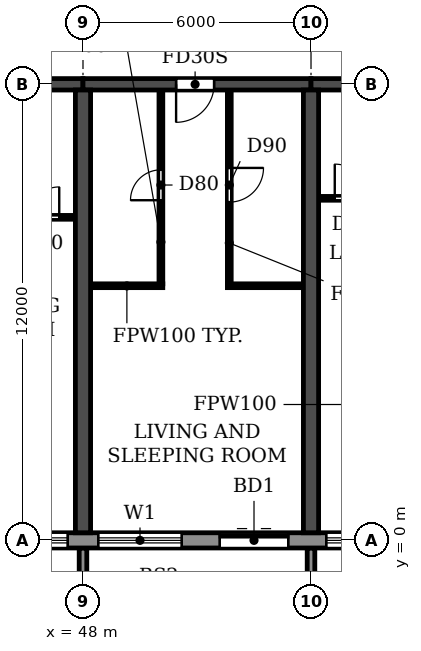
"""IFC4 building model, lengths in metres.
Left out: names, types, materials, properties, quantities, classifications, styles, units other than length and angle.
Written with IfcOpenShell. Run it as: python <this file> out.ifc"""

import sys

from ifc_helpers import new_model, si_unit, direction, frame, frame_2d, origin, place, context, subcontext, project, spatial, polyline, rectangle, outline, extrude, source, transform, mapped, element, fill, save


model = new_model("IFC4")
c1 = context("Model", 3, precision=1e-05, world=origin(), true_north=direction((0.0, 1.0)))
c2 = subcontext(c1, "Body", "Model", "MODEL_VIEW")
j1 = project(units=[si_unit("LENGTHUNIT", "METRE"), si_unit("PLANEANGLEUNIT", "RADIAN")], contexts=[c1])
p1 = place(None, origin())
s1 = spatial("IfcSite", under=j1, at=p1, CompositionType="ELEMENT")
p2 = place(p1, origin())
s2 = spatial("IfcBuilding", under=s1, at=p2, CompositionType="ELEMENT")
p3 = place(p2, frame((0.0, 0.0, 56.4)))
s3 = spatial("IfcBuildingStorey", under=s2, at=p3, CompositionType="ELEMENT", Elevation=56.4)
for number, where, z_axis, x_axis in (
    (1, (48.0, 0.2, 0.0), (0.0, 0.0, 1.0), (0.0, 1.0, 0.0)),
    (2, (54.0, 0.2, 0.0), (0.0, 0.0, 1.0), (0.0, 1.0, 0.0)),
):
    element("IfcWall", number, at=place(p3, frame(where, z_axis=z_axis, x_axis=x_axis)), inside=s3, PredefinedType="SHEAR", context=c2, shape_type="SweptSolid", body=[
        extrude(rectangle(XDim=11.65, YDim=0.4, at=frame_2d((5.825, 0.0))), origin(), (0.0, 0.0, 1.0), 3.05),
    ])
p4 = place(p3, frame((42.0, 12.0, 0.0), z_axis=(0.0, 0.0, 1.0), x_axis=(1.0, 0.0, 0.0)))
e3 = element("IfcWall", 3, at=p4, inside=s3, PredefinedType="SHEAR", context=c2, shape_type="SweptSolid", body=[
    extrude(rectangle(XDim=6.0, YDim=0.3, at=frame_2d((3.0, 0.0))), origin(), (0.0, 0.0, 1.0), 2.45),
])
p5 = place(p4, frame((2.55, 0.0, 0.0)))
e4 = element("IfcOpeningElement", 4, at=p5, cuts=e3, PredefinedType="OPENING", context=c2, shape_type="SweptSolid", body=[
    extrude(rectangle(XDim=1.0, YDim=2.1, at=frame_2d((0.5, 1.05))), frame((0.0, 0.16, 0.0), z_axis=(0.0, -1.0, 0.0), x_axis=(1.0, 0.0, 0.0)), (0.0, 0.0, 1.0), 0.32),
])
p6 = place(p3, frame((48.0, 12.0, 0.0), z_axis=(0.0, 0.0, 1.0), x_axis=(1.0, 0.0, 0.0)))
e5 = element("IfcWall", 5, at=p6, inside=s3, PredefinedType="SHEAR", context=c2, shape_type="SweptSolid", body=[
    extrude(rectangle(XDim=6.0, YDim=0.3, at=frame_2d((3.0, 0.0))), origin(), (0.0, 0.0, 1.0), 2.45),
])
p7 = place(p6, frame((2.45, 0.0, 0.0)))
e6 = element("IfcOpeningElement", 6, at=p7, cuts=e5, PredefinedType="OPENING", context=c2, shape_type="SweptSolid", body=[
    extrude(rectangle(XDim=1.0, YDim=2.1, at=frame_2d((0.5, 1.05))), frame((0.0, 0.16, 0.0), z_axis=(0.0, -1.0, 0.0), x_axis=(1.0, 0.0, 0.0)), (0.0, 0.0, 1.0), 0.32),
])
p8 = place(p3, frame((54.0, 12.0, 0.0), z_axis=(0.0, 0.0, 1.0), x_axis=(1.0, 0.0, 0.0)))
e7 = element("IfcWall", 7, at=p8, inside=s3, PredefinedType="SHEAR", context=c2, shape_type="SweptSolid", body=[
    extrude(rectangle(XDim=6.0, YDim=0.3, at=frame_2d((3.0, 0.0))), origin(), (0.0, 0.0, 1.0), 2.45),
])
p9 = place(p8, frame((2.55, 0.0, 0.0)))
e8 = element("IfcOpeningElement", 8, at=p9, cuts=e7, PredefinedType="OPENING", context=c2, shape_type="SweptSolid", body=[
    extrude(rectangle(XDim=1.0, YDim=2.1, at=frame_2d((0.5, 1.05))), frame((0.0, 0.16, 0.0), z_axis=(0.0, -1.0, 0.0), x_axis=(1.0, 0.0, 0.0)), (0.0, 0.0, 1.0), 0.32),
])
p10 = place(p3, frame((10.683, 0.0, 0.0), z_axis=(0.0, 0.0, 1.0), x_axis=(1.0, 0.0, 0.0)))
e9 = element("IfcWall", 9, at=p10, inside=s3, PredefinedType="STANDARD", context=c2, shape_type="SweptSolid", body=[
    extrude(rectangle(XDim=80.634, YDim=0.4, at=frame_2d((40.317, 0.0))), origin(), (0.0, 0.0, 1.0), 3.05),
])
p11 = place(p10, frame((1.717, 0.0, 0.9)))
e10 = element("IfcOpeningElement", 10, at=p11, cuts=e9, PredefinedType="OPENING", context=c2, shape_type="SweptSolid", body=[
    extrude(rectangle(XDim=2.2, YDim=1.5, at=frame_2d((1.1, 0.75))), frame((0.0, 0.21, 0.0), z_axis=(0.0, -1.0, 0.0), x_axis=(1.0, 0.0, 0.0)), (0.0, 0.0, 1.0), 0.42),
])
p12 = place(p10, frame((4.917, 0.0, 0.0)))
e11 = element("IfcOpeningElement", 11, at=p12, cuts=e9, PredefinedType="OPENING", context=c2, shape_type="SweptSolid", body=[
    extrude(rectangle(XDim=1.8, YDim=2.4, at=frame_2d((0.9, 1.2))), frame((0.0, 0.21, 0.0), z_axis=(0.0, -1.0, 0.0), x_axis=(1.0, 0.0, 0.0)), (0.0, 0.0, 1.0), 0.42),
])
p13 = place(p10, frame((7.717, 0.0, 0.9)))
e12 = element("IfcOpeningElement", 12, at=p13, cuts=e9, PredefinedType="OPENING", context=c2, shape_type="SweptSolid", body=[
    extrude(rectangle(XDim=2.2, YDim=1.5, at=frame_2d((1.1, 0.75))), frame((0.0, 0.21, 0.0), z_axis=(0.0, -1.0, 0.0), x_axis=(1.0, 0.0, 0.0)), (0.0, 0.0, 1.0), 0.42),
])
p14 = place(p10, frame((10.717, 0.0, 0.9)))
e13 = element("IfcOpeningElement", 13, at=p14, cuts=e9, PredefinedType="OPENING", context=c2, shape_type="SweptSolid", body=[
    extrude(rectangle(XDim=2.2, YDim=1.5, at=frame_2d((1.1, 0.75))), frame((0.0, 0.21, 0.0), z_axis=(0.0, -1.0, 0.0), x_axis=(1.0, 0.0, 0.0)), (0.0, 0.0, 1.0), 0.42),
])
p15 = place(p10, frame((13.717, 0.0, 0.9)))
e14 = element("IfcOpeningElement", 14, at=p15, cuts=e9, PredefinedType="OPENING", context=c2, shape_type="SweptSolid", body=[
    extrude(rectangle(XDim=2.2, YDim=1.5, at=frame_2d((1.1, 0.75))), frame((0.0, 0.21, 0.0), z_axis=(0.0, -1.0, 0.0), x_axis=(1.0, 0.0, 0.0)), (0.0, 0.0, 1.0), 0.42),
])
p16 = place(p10, frame((16.917, 0.0, 0.0)))
e15 = element("IfcOpeningElement", 15, at=p16, cuts=e9, PredefinedType="OPENING", context=c2, shape_type="SweptSolid", body=[
    extrude(rectangle(XDim=1.8, YDim=2.4, at=frame_2d((0.9, 1.2))), frame((0.0, 0.21, 0.0), z_axis=(0.0, -1.0, 0.0), x_axis=(1.0, 0.0, 0.0)), (0.0, 0.0, 1.0), 0.42),
])
p17 = place(p10, frame((19.717, 0.0, 0.9)))
e16 = element("IfcOpeningElement", 16, at=p17, cuts=e9, PredefinedType="OPENING", context=c2, shape_type="SweptSolid", body=[
    extrude(rectangle(XDim=2.2, YDim=1.5, at=frame_2d((1.1, 0.75))), frame((0.0, 0.21, 0.0), z_axis=(0.0, -1.0, 0.0), x_axis=(1.0, 0.0, 0.0)), (0.0, 0.0, 1.0), 0.42),
])
p18 = place(p10, frame((22.717, 0.0, 0.9)))
e17 = element("IfcOpeningElement", 17, at=p18, cuts=e9, PredefinedType="OPENING", context=c2, shape_type="SweptSolid", body=[
    extrude(rectangle(XDim=2.2, YDim=1.5, at=frame_2d((1.1, 0.75))), frame((0.0, 0.21, 0.0), z_axis=(0.0, -1.0, 0.0), x_axis=(1.0, 0.0, 0.0)), (0.0, 0.0, 1.0), 0.42),
])
p19 = place(p10, frame((25.917, 0.0, 0.0)))
e18 = element("IfcOpeningElement", 18, at=p19, cuts=e9, PredefinedType="OPENING", context=c2, shape_type="SweptSolid", body=[
    extrude(rectangle(XDim=1.8, YDim=2.4, at=frame_2d((0.9, 1.2))), frame((0.0, 0.21, 0.0), z_axis=(0.0, -1.0, 0.0), x_axis=(1.0, 0.0, 0.0)), (0.0, 0.0, 1.0), 0.42),
])
p20 = place(p10, frame((28.717, 0.0, 0.9)))
e19 = element("IfcOpeningElement", 19, at=p20, cuts=e9, PredefinedType="OPENING", context=c2, shape_type="SweptSolid", body=[
    extrude(rectangle(XDim=2.2, YDim=1.5, at=frame_2d((1.1, 0.75))), frame((0.0, 0.21, 0.0), z_axis=(0.0, -1.0, 0.0), x_axis=(1.0, 0.0, 0.0)), (0.0, 0.0, 1.0), 0.42),
])
p21 = place(p10, frame((31.717, 0.0, 0.9)))
e20 = element("IfcOpeningElement", 20, at=p21, cuts=e9, PredefinedType="OPENING", context=c2, shape_type="SweptSolid", body=[
    extrude(rectangle(XDim=2.2, YDim=1.5, at=frame_2d((1.1, 0.75))), frame((0.0, 0.21, 0.0), z_axis=(0.0, -1.0, 0.0), x_axis=(1.0, 0.0, 0.0)), (0.0, 0.0, 1.0), 0.42),
])
p22 = place(p10, frame((34.717, 0.0, 0.9)))
e21 = element("IfcOpeningElement", 21, at=p22, cuts=e9, PredefinedType="OPENING", context=c2, shape_type="SweptSolid", body=[
    extrude(rectangle(XDim=2.2, YDim=1.5, at=frame_2d((1.1, 0.75))), frame((0.0, 0.21, 0.0), z_axis=(0.0, -1.0, 0.0), x_axis=(1.0, 0.0, 0.0)), (0.0, 0.0, 1.0), 0.42),
])
p23 = place(p10, frame((37.717, 0.0, 0.9)))
e22 = element("IfcOpeningElement", 22, at=p23, cuts=e9, PredefinedType="OPENING", context=c2, shape_type="SweptSolid", body=[
    extrude(rectangle(XDim=2.2, YDim=1.5, at=frame_2d((1.1, 0.75))), frame((0.0, 0.21, 0.0), z_axis=(0.0, -1.0, 0.0), x_axis=(1.0, 0.0, 0.0)), (0.0, 0.0, 1.0), 0.42),
])
p24 = place(p10, frame((40.917, 0.0, 0.0)))
e23 = element("IfcOpeningElement", 23, at=p24, cuts=e9, PredefinedType="OPENING", context=c2, shape_type="SweptSolid", body=[
    extrude(rectangle(XDim=1.8, YDim=2.4, at=frame_2d((0.9, 1.2))), frame((0.0, 0.21, 0.0), z_axis=(0.0, -1.0, 0.0), x_axis=(1.0, 0.0, 0.0)), (0.0, 0.0, 1.0), 0.42),
])
p25 = place(p10, frame((43.717, 0.0, 0.9)))
e24 = element("IfcOpeningElement", 24, at=p25, cuts=e9, PredefinedType="OPENING", context=c2, shape_type="SweptSolid", body=[
    extrude(rectangle(XDim=2.2, YDim=1.5, at=frame_2d((1.1, 0.75))), frame((0.0, 0.21, 0.0), z_axis=(0.0, -1.0, 0.0), x_axis=(1.0, 0.0, 0.0)), (0.0, 0.0, 1.0), 0.42),
])
p26 = place(p10, frame((46.717, 0.0, 0.9)))
e25 = element("IfcOpeningElement", 25, at=p26, cuts=e9, PredefinedType="OPENING", context=c2, shape_type="SweptSolid", body=[
    extrude(rectangle(XDim=2.2, YDim=1.5, at=frame_2d((1.1, 0.75))), frame((0.0, 0.21, 0.0), z_axis=(0.0, -1.0, 0.0), x_axis=(1.0, 0.0, 0.0)), (0.0, 0.0, 1.0), 0.42),
])
p27 = place(p10, frame((49.717, 0.0, 0.9)))
e26 = element("IfcOpeningElement", 26, at=p27, cuts=e9, PredefinedType="OPENING", context=c2, shape_type="SweptSolid", body=[
    extrude(rectangle(XDim=2.2, YDim=1.5, at=frame_2d((1.1, 0.75))), frame((0.0, 0.21, 0.0), z_axis=(0.0, -1.0, 0.0), x_axis=(1.0, 0.0, 0.0)), (0.0, 0.0, 1.0), 0.42),
])
p28 = place(p10, frame((52.717, 0.0, 0.9)))
e27 = element("IfcOpeningElement", 27, at=p28, cuts=e9, PredefinedType="OPENING", context=c2, shape_type="SweptSolid", body=[
    extrude(rectangle(XDim=2.2, YDim=1.5, at=frame_2d((1.1, 0.75))), frame((0.0, 0.21, 0.0), z_axis=(0.0, -1.0, 0.0), x_axis=(1.0, 0.0, 0.0)), (0.0, 0.0, 1.0), 0.42),
])
p29 = place(p10, frame((55.717, 0.0, 0.9)))
e28 = element("IfcOpeningElement", 28, at=p29, cuts=e9, PredefinedType="OPENING", context=c2, shape_type="SweptSolid", body=[
    extrude(rectangle(XDim=2.2, YDim=1.5, at=frame_2d((1.1, 0.75))), frame((0.0, 0.21, 0.0), z_axis=(0.0, -1.0, 0.0), x_axis=(1.0, 0.0, 0.0)), (0.0, 0.0, 1.0), 0.42),
])
p30 = place(p10, frame((58.717, 0.0, 0.9)))
e29 = element("IfcOpeningElement", 29, at=p30, cuts=e9, PredefinedType="OPENING", context=c2, shape_type="SweptSolid", body=[
    extrude(rectangle(XDim=2.2, YDim=1.5, at=frame_2d((1.1, 0.75))), frame((0.0, 0.21, 0.0), z_axis=(0.0, -1.0, 0.0), x_axis=(1.0, 0.0, 0.0)), (0.0, 0.0, 1.0), 0.42),
])
p31 = place(p10, frame((61.717, 0.0, 0.9)))
e30 = element("IfcOpeningElement", 30, at=p31, cuts=e9, PredefinedType="OPENING", context=c2, shape_type="SweptSolid", body=[
    extrude(rectangle(XDim=2.2, YDim=1.5, at=frame_2d((1.1, 0.75))), frame((0.0, 0.21, 0.0), z_axis=(0.0, -1.0, 0.0), x_axis=(1.0, 0.0, 0.0)), (0.0, 0.0, 1.0), 0.42),
])
p32 = place(p10, frame((64.917, 0.0, 0.0)))
e31 = element("IfcOpeningElement", 31, at=p32, cuts=e9, PredefinedType="OPENING", context=c2, shape_type="SweptSolid", body=[
    extrude(rectangle(XDim=1.8, YDim=2.4, at=frame_2d((0.9, 1.2))), frame((0.0, 0.21, 0.0), z_axis=(0.0, -1.0, 0.0), x_axis=(1.0, 0.0, 0.0)), (0.0, 0.0, 1.0), 0.42),
])
p33 = place(p10, frame((67.717, 0.0, 0.9)))
e32 = element("IfcOpeningElement", 32, at=p33, cuts=e9, PredefinedType="OPENING", context=c2, shape_type="SweptSolid", body=[
    extrude(rectangle(XDim=2.2, YDim=1.5, at=frame_2d((1.1, 0.75))), frame((0.0, 0.21, 0.0), z_axis=(0.0, -1.0, 0.0), x_axis=(1.0, 0.0, 0.0)), (0.0, 0.0, 1.0), 0.42),
])
p34 = place(p10, frame((70.717, 0.0, 0.9)))
e33 = element("IfcOpeningElement", 33, at=p34, cuts=e9, PredefinedType="OPENING", context=c2, shape_type="SweptSolid", body=[
    extrude(rectangle(XDim=2.2, YDim=1.5, at=frame_2d((1.1, 0.75))), frame((0.0, 0.21, 0.0), z_axis=(0.0, -1.0, 0.0), x_axis=(1.0, 0.0, 0.0)), (0.0, 0.0, 1.0), 0.42),
])
p35 = place(p10, frame((73.717, 0.0, 0.9)))
e34 = element("IfcOpeningElement", 34, at=p35, cuts=e9, PredefinedType="OPENING", context=c2, shape_type="SweptSolid", body=[
    extrude(rectangle(XDim=2.2, YDim=1.5, at=frame_2d((1.1, 0.75))), frame((0.0, 0.21, 0.0), z_axis=(0.0, -1.0, 0.0), x_axis=(1.0, 0.0, 0.0)), (0.0, 0.0, 1.0), 0.42),
])
p36 = place(p10, frame((76.917, 0.0, 0.0)))
e35 = element("IfcOpeningElement", 35, at=p36, cuts=e9, PredefinedType="OPENING", context=c2, shape_type="SweptSolid", body=[
    extrude(rectangle(XDim=1.8, YDim=2.4, at=frame_2d((0.9, 1.2))), frame((0.0, 0.21, 0.0), z_axis=(0.0, -1.0, 0.0), x_axis=(1.0, 0.0, 0.0)), (0.0, 0.0, 1.0), 0.42),
])
m1 = source(origin(), c2, "Body", "SweptSolid", [
    extrude(outline(polyline([(0.0, 0.0), (0.2, 0.0), (0.2, 1.65), (0.0, 1.65), (0.0, 0.0)])), origin(), (0.0, 0.0, 1.0), 3.1),
])
for number, where in (
    (36, (47.9, -1.85, 0.0)),
    (37, (53.9, -1.85, 0.0)),
):
    element("IfcWall", number, at=place(p3, frame(where)), inside=s3, PredefinedType="STANDARD", context=c2, shape_type="MappedRepresentation", body=[
        mapped(m1, transform((0.0, 0.0, 0.0))),
    ])
p37 = place(p3, frame((48.21, 6.7, 0.0), z_axis=(0.0, 0.0, 1.0), x_axis=(1.0, 0.0, 0.0)))
e38 = element("IfcWall", 38, at=p37, inside=s3, PredefinedType="PARTITIONING", context=c2, shape_type="SweptSolid", body=[
    extrude(rectangle(XDim=1.89, YDim=0.1, at=frame_2d((0.945, 0.0))), origin(), (0.0, 0.0, 1.0), 3.05),
])
p38 = place(p3, frame((51.8, 6.7, 0.0), z_axis=(0.0, 0.0, 1.0), x_axis=(1.0, 0.0, 0.0)))
e39 = element("IfcWall", 39, at=p38, inside=s3, PredefinedType="PARTITIONING", context=c2, shape_type="SweptSolid", body=[
    extrude(rectangle(XDim=1.99, YDim=0.1, at=frame_2d((0.995, 0.0))), origin(), (0.0, 0.0, 1.0), 3.05),
])
p39 = place(p3, frame((45.9, 8.5, 0.0), z_axis=(0.0, 0.0, 1.0), x_axis=(1.0, 0.0, 0.0)))
e40 = element("IfcWall", 40, at=p39, inside=s3, PredefinedType="PARTITIONING", context=c2, shape_type="SweptSolid", body=[
    extrude(rectangle(XDim=1.89, YDim=0.1, at=frame_2d((0.945, 0.0))), origin(), (0.0, 0.0, 1.0), 3.05),
])
p40 = place(p39, frame((0.675, 0.0, 0.0)))
e41 = element("IfcOpeningElement", 41, at=p40, cuts=e40, PredefinedType="OPENING", context=c2, shape_type="SweptSolid", body=[
    extrude(rectangle(XDim=0.8, YDim=2.1, at=frame_2d((0.4, 1.05))), frame((0.0, 0.06, 0.0), z_axis=(0.0, -1.0, 0.0), x_axis=(1.0, 0.0, 0.0)), (0.0, 0.0, 1.0), 0.12),
])
p41 = place(p3, frame((54.21, 9.0, 0.0), z_axis=(0.0, 0.0, 1.0), x_axis=(1.0, 0.0, 0.0)))
e42 = element("IfcWall", 42, at=p41, inside=s3, PredefinedType="PARTITIONING", context=c2, shape_type="SweptSolid", body=[
    extrude(rectangle(XDim=1.99, YDim=0.1, at=frame_2d((0.995, 0.0))), origin(), (0.0, 0.0, 1.0), 3.05),
])
p42 = place(p41, frame((0.415, 0.0, 0.0)))
e43 = element("IfcOpeningElement", 43, at=p42, cuts=e42, PredefinedType="OPENING", context=c2, shape_type="SweptSolid", body=[
    extrude(rectangle(XDim=0.9, YDim=2.1, at=frame_2d((0.45, 1.05))), frame((0.0, 0.06, 0.0), z_axis=(0.0, -1.0, 0.0), x_axis=(1.0, 0.0, 0.0)), (0.0, 0.0, 1.0), 0.12),
])
p43 = place(p3, frame((50.05, 6.75, 0.0), z_axis=(0.0, 0.0, 1.0), x_axis=(0.0, 1.0, 0.0)))
e44 = element("IfcWall", 44, at=p43, inside=s3, PredefinedType="PARTITIONING", context=c2, shape_type="SweptSolid", body=[
    extrude(rectangle(XDim=5.09, YDim=0.1, at=frame_2d((2.545, 0.0))), origin(), (0.0, 0.0, 1.0), 3.05),
])
p44 = place(p43, frame((2.2, 0.0, 0.0)))
e45 = element("IfcOpeningElement", 45, at=p44, cuts=e44, PredefinedType="OPENING", context=c2, shape_type="SweptSolid", body=[
    extrude(rectangle(XDim=0.8, YDim=2.1, at=frame_2d((0.4, 1.05))), frame((0.0, 0.06, 0.0), z_axis=(0.0, -1.0, 0.0), x_axis=(1.0, 0.0, 0.0)), (0.0, 0.0, 1.0), 0.12),
])
p45 = place(p3, frame((51.85, 6.75, 0.0), z_axis=(0.0, 0.0, 1.0), x_axis=(0.0, 1.0, 0.0)))
e46 = element("IfcWall", 46, at=p45, inside=s3, PredefinedType="PARTITIONING", context=c2, shape_type="SweptSolid", body=[
    extrude(rectangle(XDim=5.09, YDim=0.1, at=frame_2d((2.545, 0.0))), origin(), (0.0, 0.0, 1.0), 3.05),
])
p46 = place(p45, frame((2.15, 0.0, 0.0)))
e47 = element("IfcOpeningElement", 47, at=p46, cuts=e46, PredefinedType="OPENING", context=c2, shape_type="SweptSolid", body=[
    extrude(rectangle(XDim=0.9, YDim=2.1, at=frame_2d((0.45, 1.05))), frame((0.0, 0.06, 0.0), z_axis=(0.0, -1.0, 0.0), x_axis=(1.0, 0.0, 0.0)), (0.0, 0.0, 1.0), 0.12),
])
p47 = place(p22, origin())
e48 = element("IfcWindow", 48, at=p47, inside=s3, PartitioningType="DOUBLE_PANEL_HORIZONTAL", PredefinedType="WINDOW", context=c2, shape_type="SweptSolid", body=[
    extrude(rectangle(XDim=2.2, YDim=1.5, at=frame_2d((1.1, 0.75))), frame((0.0, 0.03, 0.0), z_axis=(0.0, -1.0, 0.0), x_axis=(1.0, 0.0, 0.0)), (0.0, 0.0, 1.0), 0.06),
])
fill(e21, e48)
p48 = place(p23, origin())
e49 = element("IfcWindow", 49, at=p48, inside=s3, PartitioningType="DOUBLE_PANEL_HORIZONTAL", PredefinedType="WINDOW", context=c2, shape_type="SweptSolid", body=[
    extrude(rectangle(XDim=2.2, YDim=1.5, at=frame_2d((1.1, 0.75))), frame((0.0, 0.03, 0.0), z_axis=(0.0, -1.0, 0.0), x_axis=(1.0, 0.0, 0.0)), (0.0, 0.0, 1.0), 0.06),
])
fill(e22, e49)
p49 = place(p24, origin())
e50 = element("IfcDoor", 50, at=p49, inside=s3, OperationType="DOUBLE_DOOR_SLIDING", PredefinedType="DOOR", context=c2, shape_type="SweptSolid", body=[
    extrude(rectangle(XDim=1.8, YDim=2.4, at=frame_2d((0.9, 1.2))), frame((0.0, 0.025, 0.0), z_axis=(0.0, -1.0, 0.0), x_axis=(1.0, 0.0, 0.0)), (0.0, 0.0, 1.0), 0.05),
])
fill(e23, e50)
p50 = place(p25, origin())
e51 = element("IfcWindow", 51, at=p50, inside=s3, PartitioningType="DOUBLE_PANEL_HORIZONTAL", PredefinedType="WINDOW", context=c2, shape_type="SweptSolid", body=[
    extrude(rectangle(XDim=2.2, YDim=1.5, at=frame_2d((1.1, 0.75))), frame((0.0, 0.03, 0.0), z_axis=(0.0, -1.0, 0.0), x_axis=(1.0, 0.0, 0.0)), (0.0, 0.0, 1.0), 0.06),
])
fill(e24, e51)
p51 = place(p40, origin())
e52 = element("IfcDoor", 52, at=p51, inside=s3, OperationType="SINGLE_SWING_RIGHT", PredefinedType="DOOR", context=c2, shape_type="SweptSolid", body=[
    extrude(rectangle(XDim=0.8, YDim=2.1, at=frame_2d((0.4, 1.05))), frame((0.0, 0.025, 0.0), z_axis=(0.0, -1.0, 0.0), x_axis=(1.0, 0.0, 0.0)), (0.0, 0.0, 1.0), 0.05),
])
fill(e41, e52)
p52 = place(p44, origin())
e53 = element("IfcDoor", 53, at=p52, inside=s3, OperationType="SINGLE_SWING_LEFT", PredefinedType="DOOR", context=c2, shape_type="SweptSolid", body=[
    extrude(rectangle(XDim=0.8, YDim=2.1, at=frame_2d((0.4, 1.05))), frame((0.0, 0.025, 0.0), z_axis=(0.0, -1.0, 0.0), x_axis=(1.0, 0.0, 0.0)), (0.0, 0.0, 1.0), 0.05),
])
fill(e45, e53)
p53 = place(p7, frame((1.0, 0.0, 0.0), z_axis=(0.0, 0.0, 1.0), x_axis=(-1.0, 0.0, 0.0)))
e54 = element("IfcDoor", 54, at=p53, inside=s3, OperationType="SINGLE_SWING_RIGHT", PredefinedType="DOOR", context=c2, shape_type="SweptSolid", body=[
    extrude(rectangle(XDim=1.0, YDim=2.1, at=frame_2d((0.5, 1.05))), frame((0.0, 0.025, 0.0), z_axis=(0.0, -1.0, 0.0), x_axis=(1.0, 0.0, 0.0)), (0.0, 0.0, 1.0), 0.05),
])
fill(e6, e54)
p54 = place(p46, frame((0.9, 0.0, 0.0), z_axis=(0.0, 0.0, 1.0), x_axis=(-1.0, 0.0, 0.0)))
e55 = element("IfcDoor", 55, at=p54, inside=s3, OperationType="SINGLE_SWING_LEFT", PredefinedType="DOOR", context=c2, shape_type="SweptSolid", body=[
    extrude(rectangle(XDim=0.9, YDim=2.1, at=frame_2d((0.45, 1.05))), frame((0.0, 0.025, 0.0), z_axis=(0.0, -1.0, 0.0), x_axis=(1.0, 0.0, 0.0)), (0.0, 0.0, 1.0), 0.05),
])
fill(e47, e55)
p55 = place(p42, origin())
e56 = element("IfcDoor", 56, at=p55, inside=s3, OperationType="SINGLE_SWING_LEFT", PredefinedType="DOOR", context=c2, shape_type="SweptSolid", body=[
    extrude(rectangle(XDim=0.9, YDim=2.1, at=frame_2d((0.45, 1.05))), frame((0.0, 0.025, 0.0), z_axis=(0.0, -1.0, 0.0), x_axis=(1.0, 0.0, 0.0)), (0.0, 0.0, 1.0), 0.05),
])
fill(e43, e56)
save(model, sys.argv[1])
